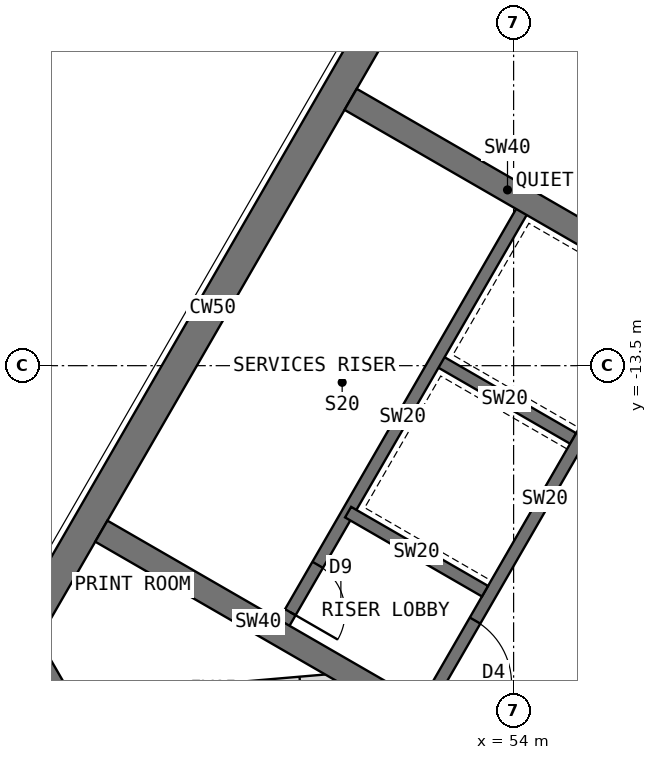
"""IFC4 building model, lengths in metres.
Left out: names, types, materials, properties, quantities, classifications, styles, units other than length and angle.
Written with IfcOpenShell. Run it as: python <this file> out.ifc"""

import sys

from ifc_helpers import new_model, si_unit, direction, frame, frame_2d, origin, place, context, subcontext, project, spatial, rectangle, extrude, element, fill, save


model = new_model("IFC4")
c1 = context("Model", 3, precision=1e-05, world=origin(), true_north=direction((0.0, 1.0)))
c2 = subcontext(c1, "Body", "Model", "MODEL_VIEW")
j1 = project(units=[si_unit("LENGTHUNIT", "METRE"), si_unit("PLANEANGLEUNIT", "RADIAN")], contexts=[c1])
p1 = place(None, origin())
s1 = spatial("IfcSite", under=j1, at=p1, CompositionType="ELEMENT")
p2 = place(p1, origin())
s2 = spatial("IfcBuilding", under=s1, at=p2, CompositionType="ELEMENT")
p3 = place(p2, frame((0.0, 0.0, 230.5)))
s3 = spatial("IfcBuildingStorey", under=s2, at=p3, CompositionType="ELEMENT", Elevation=230.5)
p4 = place(p3, frame((52.202, -7.092, 0.0), z_axis=(0.0, 0.0, 1.0), x_axis=(-0.500005998175, -0.866021940709, 0.0)))
e1 = element("IfcWall", 1, at=p4, inside=s3, PredefinedType="SHEAR", context=c2, shape_type="SweptSolid", body=[
    extrude(rectangle(XDim=12.596, YDim=0.5, at=frame_2d((6.298, 0.0))), origin(), (0.0, 0.0, 1.0), 4.0),
])
p5 = place(p3, frame((45.904, -18.0, 0.0), z_axis=(0.0, 0.0, 1.0), x_axis=(0.500024481964, -0.866011268655, 0.0)))
e2 = element("IfcWall", 2, at=p5, inside=s3, PredefinedType="SHEAR", context=c2, shape_type="SweptSolid", body=[
    extrude(rectangle(XDim=4.548, YDim=0.5, at=frame_2d((2.274, 0.0))), origin(), (0.0, 0.0, 1.0), 4.0),
])
p6 = place(p3, frame((56.516, -12.236, 0.0), z_axis=(0.0, 0.0, 1.0), x_axis=(-0.49999894854, -0.866026010844, 0.0)))
e3 = element("IfcWall", 3, at=p6, inside=s3, PredefinedType="SHEAR", context=c2, shape_type="SweptSolid", body=[
    extrude(rectangle(XDim=8.0, YDim=0.2, at=frame_2d((4.0, 0.0))), origin(), (0.0, 0.0, 1.0), 4.0),
])
p7 = place(p6, frame((6.3, 0.0, 0.0)))
e4 = element("IfcOpeningElement", 4, at=p7, cuts=e3, PredefinedType="OPENING", context=c2, shape_type="SweptSolid", body=[
    extrude(rectangle(XDim=1.2, YDim=2.1, at=frame_2d((0.6, 1.05))), frame((0.0, 0.11, 0.0), z_axis=(0.0, -1.0, 0.0), x_axis=(1.0, 0.0, 0.0)), (0.0, 0.0, 1.0), 0.22),
])
for number, where, z_axis, x_axis in (
    (5, (54.98, -14.697, 0.0), (0.0, 0.0, 1.0), (-0.866, 0.5, 0.0)),
    (6, (53.53, -17.209, 0.0), (0.0, 0.0, 1.0), (-0.866, 0.5, 0.0)),
):
    element("IfcWall", number, at=place(p3, frame(where, z_axis=z_axis, x_axis=x_axis)), inside=s3, PredefinedType="SHEAR", context=c2, shape_type="SweptSolid", body=[
        extrude(rectangle(XDim=2.6, YDim=0.2, at=frame_2d((1.3, 0.0))), origin(), (0.0, 0.0, 1.0), 4.0),
    ])
p8 = place(p3, frame((54.178, -10.886, 0.0), z_axis=(0.0, 0.0, 1.0), x_axis=(-0.49999894854, -0.866026010844, 0.0)))
e7 = element("IfcWall", 7, at=p8, inside=s3, PredefinedType="SHEAR", context=c2, shape_type="SweptSolid", body=[
    extrude(rectangle(XDim=8.0, YDim=0.2, at=frame_2d((4.0, 0.0))), origin(), (0.0, 0.0, 1.0), 4.0),
])
p9 = place(p8, frame((6.8, 0.0, 0.0)))
e8 = element("IfcOpeningElement", 8, at=p9, cuts=e7, PredefinedType="OPENING", context=c2, shape_type="SweptSolid", body=[
    extrude(rectangle(XDim=0.9, YDim=2.1, at=frame_2d((0.45, 1.05))), frame((0.0, 0.11, 0.0), z_axis=(0.0, -1.0, 0.0), x_axis=(1.0, 0.0, 0.0)), (0.0, 0.0, 1.0), 0.22),
])
p10 = place(p3, frame((52.38, -19.201, 0.0), z_axis=(0.0, 0.0, 1.0), x_axis=(-0.866012946976, 0.500021575205, 0.0)))
e9 = element("IfcWall", 9, at=p10, inside=s3, PredefinedType="SHEAR", context=c2, shape_type="SweptSolid", body=[
    extrude(rectangle(XDim=5.958, YDim=0.4, at=frame_2d((2.979, 0.0))), origin(), (0.0, 0.0, 1.0), 4.0),
])
p11 = place(p3, frame((56.48, -12.099, 0.0), z_axis=(0.0, 0.0, 1.0), x_axis=(-0.86602319114, 0.500003832394, 0.0)))
e10 = element("IfcWall", 10, at=p11, inside=s3, PredefinedType="SHEAR", context=c2, shape_type="SweptSolid", body=[
    extrude(rectangle(XDim=5.958, YDim=0.4, at=frame_2d((2.979, 0.0))), origin(), (0.0, 0.0, 1.0), 4.0),
])
p12 = place(p3, frame((51.364, -18.614, 0.0), z_axis=(0.0, 0.0, 1.0), x_axis=(-0.996314617181, -0.085774026317, 0.0)))
e11 = element("IfcWall", 11, at=p12, inside=s3, PredefinedType="PARTITIONING", context=c2, shape_type="SweptSolid", body=[
    extrude(rectangle(XDim=4.605, YDim=0.15, at=frame_2d((2.303, 0.0))), origin(), (0.0, 0.0, 1.0), 3.8),
])
p13 = place(p12, frame((0.882, 0.0, 0.0)))
e12 = element("IfcOpeningElement", 12, at=p13, cuts=e11, PredefinedType="OPENING", context=c2, shape_type="SweptSolid", body=[
    extrude(rectangle(XDim=1.0, YDim=2.1, at=frame_2d((0.5, 1.05))), frame((0.0, 0.085, 0.0), z_axis=(0.0, -1.0, 0.0), x_axis=(1.0, 0.0, 0.0)), (0.0, 0.0, 1.0), 0.17),
])
p14 = place(p7, origin())
e13 = element("IfcDoor", 13, at=p14, inside=s3, OperationType="SINGLE_SWING_RIGHT", PredefinedType="DOOR", context=c2, shape_type="SweptSolid", body=[
    extrude(rectangle(XDim=1.2, YDim=2.1, at=frame_2d((0.6, 1.05))), frame((0.0, 0.025, 0.0), z_axis=(0.0, -1.0, 0.0), x_axis=(1.0, 0.0, 0.0)), (0.0, 0.0, 1.0), 0.05),
])
fill(e4, e13)
p15 = place(p9, origin())
e14 = element("IfcDoor", 14, at=p15, inside=s3, OperationType="SINGLE_SWING_RIGHT", PredefinedType="DOOR", context=c2, shape_type="SweptSolid", body=[
    extrude(rectangle(XDim=0.9, YDim=2.1, at=frame_2d((0.45, 1.05))), frame((0.0, 0.025, 0.0), z_axis=(0.0, -1.0, 0.0), x_axis=(1.0, 0.0, 0.0)), (0.0, 0.0, 1.0), 0.05),
])
fill(e8, e14)
p16 = place(p13, origin())
e15 = element("IfcDoor", 15, at=p16, inside=s3, OperationType="SINGLE_SWING_LEFT", PredefinedType="DOOR", context=c2, shape_type="SweptSolid", body=[
    extrude(rectangle(XDim=1.0, YDim=2.1, at=frame_2d((0.5, 1.05))), frame((0.0, 0.025, 0.0), z_axis=(0.0, -1.0, 0.0), x_axis=(1.0, 0.0, 0.0)), (0.0, 0.0, 1.0), 0.05),
])
fill(e12, e15)
save(model, sys.argv[1])
